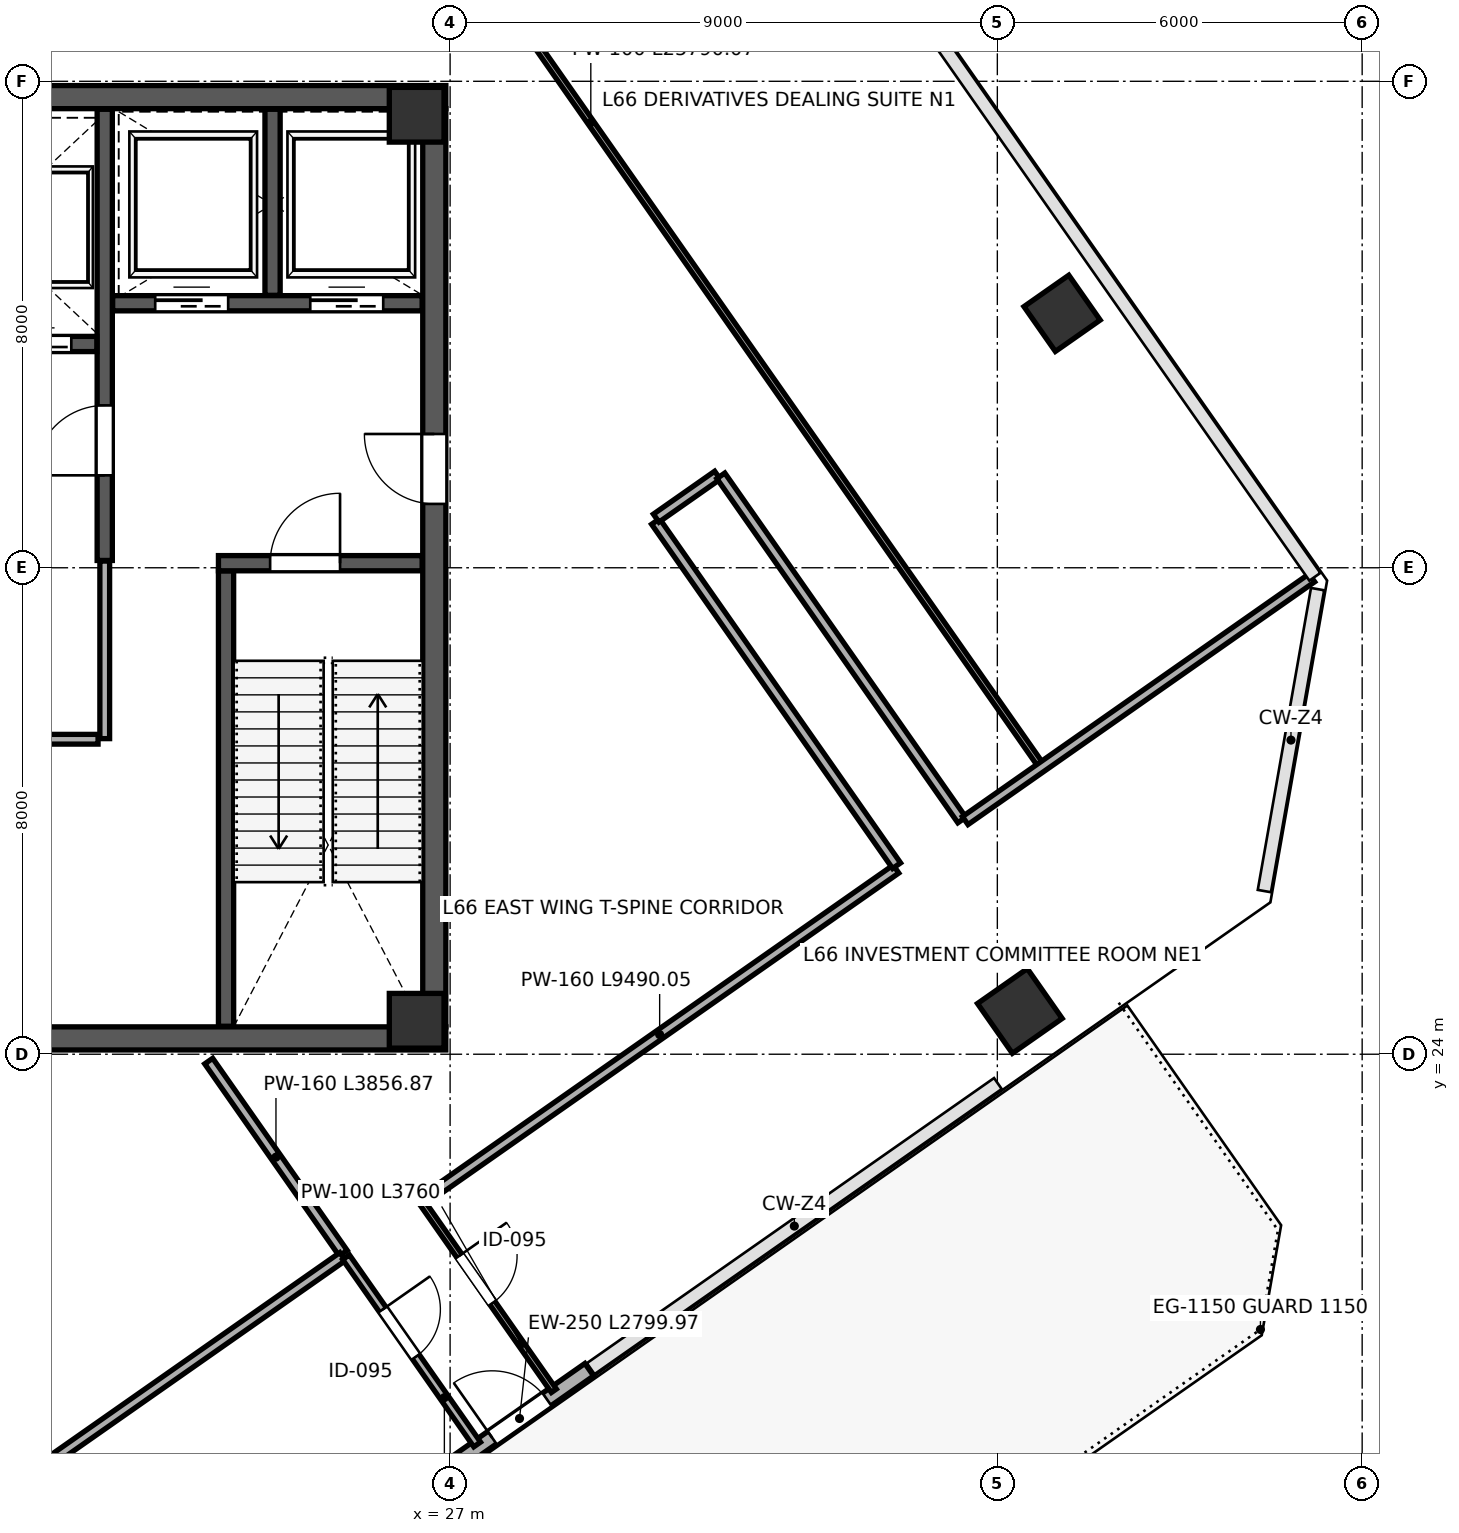
"""IFC4 building model, lengths in metres.
Left out: names, types, materials, properties, quantities, classifications, styles, units other than length and angle.
Written with IfcOpenShell. Run it as: python <this file> out.ifc"""

import sys

from ifc_helpers import new_model, si_unit, direction, frame, frame_2d, origin, origin_2d, place, context, subcontext, project, spatial, rectangle, extrude, source, transform, mapped, element, fill, save


model = new_model("IFC4")
c1 = context("Model", 3, precision=1e-05, world=origin(), true_north=direction((0.0, 1.0)))
c2 = subcontext(c1, "Body", "Model", "MODEL_VIEW")
j1 = project(units=[si_unit("LENGTHUNIT", "METRE"), si_unit("PLANEANGLEUNIT", "RADIAN")], contexts=[c1])
p1 = place(None, origin())
s1 = spatial("IfcSite", under=j1, at=p1, CompositionType="ELEMENT")
p2 = place(p1, origin())
s2 = spatial("IfcBuilding", under=s1, at=p2, CompositionType="ELEMENT")
p3 = place(p2, frame((0.0, 0.0, 293.8)))
s3 = spatial("IfcBuildingStorey", under=s2, at=p3, CompositionType="ELEMENT", Elevation=293.8)
m1 = source(origin(), c2, "Body", "SweptSolid", [
    extrude(rectangle(XDim=0.9, YDim=0.9, at=origin_2d()), origin(), (0.0, 0.0, 1.0), 4.999),
])
for number, where, z_axis, x_axis in (
    (1, (26.45, 24.55, 0.001), (0.0, 0.0, 1.0), (1.0, 0.0, 0.0)),
    (2, (26.45, 39.45, 0.001), (0.0, 0.0, 1.0), (1.0, 0.0, 0.0)),
):
    element("IfcColumn", number, at=place(p3, frame(where, z_axis=z_axis, x_axis=x_axis)), inside=s3, PredefinedType="COLUMN", context=c2, shape_type="MappedRepresentation", body=[
        mapped(m1, transform((0.0, 0.0, 0.0), scale=1.0)),
    ])
m2 = source(origin(), c2, "Body", "SweptSolid", [
    extrude(rectangle(XDim=0.9, YDim=0.9, at=origin_2d()), origin(), (0.0, 0.0, 1.0), 4.999),
])
p4 = place(p3, frame((37.065, 36.184, 0.001), z_axis=(0.0, 0.0, 1.0), x_axis=(-0.573576436351, 0.819152044289, 0.0)))
e3 = element("IfcColumn", 3, at=p4, inside=s3, PredefinedType="COLUMN", context=c2, shape_type="MappedRepresentation", body=[
    mapped(m2, transform((0.0, 0.0, 0.0), scale=1.0)),
])
m3 = source(origin(), c2, "Body", "SweptSolid", [
    extrude(rectangle(XDim=1.0, YDim=1.0, at=origin_2d()), origin(), (0.0, 0.0, 1.0), 4.999),
])
p5 = place(p3, frame((36.37, 24.711, 0.001), z_axis=(0.0, 0.0, 1.0), x_axis=(-0.573576436351, 0.819152044289, 0.0)))
e4 = element("IfcColumn", 4, at=p5, inside=s3, PredefinedType="COLUMN", context=c2, shape_type="MappedRepresentation", body=[
    mapped(m3, transform((0.0, 0.0, 0.0), scale=1.0)),
])
p6 = place(p3, frame((26.995, 17.206, 0.0), z_axis=(0.0, 0.0, 1.0), x_axis=(0.819141785879, 0.573591086599, 0.0)))
e5 = element("IfcWall", 5, at=p6, inside=s3, PredefinedType="SOLIDWALL", context=c2, shape_type="SweptSolid", body=[
    extrude(rectangle(XDim=2.8, YDim=0.25, at=frame_2d((1.4, 0.0))), origin(), (0.0, 0.0, 1.0), 4.76),
])
p7 = place(p6, frame((0.85, 0.0, 0.0)))
e6 = element("IfcOpeningElement", 6, at=p7, cuts=e5, PredefinedType="OPENING", context=c2, shape_type="SweptSolid", body=[
    extrude(rectangle(XDim=1.1, YDim=2.2, at=frame_2d((0.55, 1.1))), frame((0.0, 0.135, 0.0), z_axis=(0.0, -1.0, 0.0), x_axis=(1.0, 0.0, 0.0)), (0.0, 0.0, 1.0), 0.27),
])
p8 = place(p3, frame((26.74, 24.45, 0.0), z_axis=(0.0, 0.0, 1.0), x_axis=(0.0, 1.0, 0.0)))
e7 = element("IfcWall", 7, at=p8, inside=s3, PredefinedType="SHEAR", context=c2, shape_type="SweptSolid", body=[
    extrude(rectangle(XDim=15.1, YDim=0.38, at=frame_2d((7.55, 0.0))), origin(), (0.0, 0.0, 1.0), 4.76),
])
p9 = place(p8, frame((8.6, 0.0, 0.0)))
e8 = element("IfcOpeningElement", 8, at=p9, cuts=e7, PredefinedType="OPENING", context=c2, shape_type="SweptSolid", body=[
    extrude(rectangle(XDim=1.15, YDim=2.2, at=frame_2d((0.575, 1.1))), frame((0.0, 0.2, 0.0), z_axis=(0.0, -1.0, 0.0), x_axis=(1.0, 0.0, 0.0)), (0.0, 0.0, 1.0), 0.4),
])
for number, where, z_axis, x_axis in (
    (9, (9.07, 24.26, 0.0), (0.0, 0.0, 1.0), (1.0, 0.0, 0.0)),
    (10, (9.07, 39.74, 0.0), (0.0, 0.0, 1.0), (1.0, 0.0, 0.0)),
):
    element("IfcWall", number, at=place(p3, frame(where, z_axis=z_axis, x_axis=x_axis)), inside=s3, PredefinedType="SHEAR", context=c2, shape_type="SweptSolid", body=[
        extrude(rectangle(XDim=17.86, YDim=0.38, at=frame_2d((8.93, 0.0))), origin(), (0.0, 0.0, 1.0), 4.76),
    ])
p10 = place(p3, frame((23.315, 24.46, 0.0), z_axis=(0.0, 0.0, 1.0), x_axis=(0.0, 1.0, 0.0)))
e11 = element("IfcWall", 11, at=p10, inside=s3, PredefinedType="SHEAR", context=c2, shape_type="SweptSolid", body=[
    extrude(rectangle(XDim=7.49, YDim=0.25, at=frame_2d((3.745, 0.0))), origin(), (0.0, 0.0, 1.0), 4.76),
])
p11 = place(p3, frame((23.19, 32.075, 0.0), z_axis=(0.0, 0.0, 1.0), x_axis=(1.0, 0.0, 0.0)))
e12 = element("IfcWall", 12, at=p11, inside=s3, PredefinedType="SHEAR", context=c2, shape_type="SweptSolid", body=[
    extrude(rectangle(XDim=3.35, YDim=0.25, at=frame_2d((1.675, 0.0))), origin(), (0.0, 0.0, 1.0), 4.76),
])
p12 = place(p11, frame((0.85, 0.0, 0.0)))
e13 = element("IfcOpeningElement", 13, at=p12, cuts=e12, PredefinedType="OPENING", context=c2, shape_type="SweptSolid", body=[
    extrude(rectangle(XDim=1.15, YDim=2.2, at=frame_2d((0.575, 1.1))), frame((0.0, 0.135, 0.0), z_axis=(0.0, -1.0, 0.0), x_axis=(1.0, 0.0, 0.0)), (0.0, 0.0, 1.0), 0.27),
])
p13 = place(p3, frame((21.32, 32.12, 0.0), z_axis=(0.0, 0.0, 1.0), x_axis=(0.0, 1.0, 0.0)))
e14 = element("IfcWall", 14, at=p13, inside=s3, PredefinedType="SHEAR", context=c2, shape_type="SweptSolid", body=[
    extrude(rectangle(XDim=7.42, YDim=0.25, at=frame_2d((3.71, 0.0))), origin(), (0.0, 0.0, 1.0), 4.76),
])
p14 = place(p13, frame((1.4, 0.0, 0.0)))
e15 = element("IfcOpeningElement", 15, at=p14, cuts=e14, PredefinedType="OPENING", context=c2, shape_type="SweptSolid", body=[
    extrude(rectangle(XDim=1.15, YDim=2.2, at=frame_2d((0.575, 1.1))), frame((0.0, 0.135, 0.0), z_axis=(0.0, -1.0, 0.0), x_axis=(1.0, 0.0, 0.0)), (0.0, 0.0, 1.0), 0.27),
])
p15 = place(p3, frame((21.45, 36.35, 0.0), z_axis=(0.0, 0.0, 1.0), x_axis=(1.0, 0.0, 0.0)))
e16 = element("IfcWall", 16, at=p15, inside=s3, PredefinedType="SHEAR", context=c2, shape_type="SweptSolid", body=[
    extrude(rectangle(XDim=5.09, YDim=0.25, at=frame_2d((2.545, 0.0))), origin(), (0.0, 0.0, 1.0), 4.76),
])
p16 = place(p15, frame((0.7, 0.0, 0.0)))
e17 = element("IfcOpeningElement", 17, at=p16, cuts=e16, PredefinedType="OPENING", context=c2, shape_type="SweptSolid", body=[
    extrude(rectangle(XDim=1.2, YDim=2.2, at=frame_2d((0.6, 1.1))), frame((0.0, 0.135, 0.0), z_axis=(0.0, -1.0, 0.0), x_axis=(1.0, 0.0, 0.0)), (0.0, 0.0, 1.0), 0.27),
])
p17 = place(p15, frame((3.25, 0.0, 0.0)))
e18 = element("IfcOpeningElement", 18, at=p17, cuts=e16, PredefinedType="OPENING", context=c2, shape_type="SweptSolid", body=[
    extrude(rectangle(XDim=1.2, YDim=2.2, at=frame_2d((0.6, 1.1))), frame((0.0, 0.135, 0.0), z_axis=(0.0, -1.0, 0.0), x_axis=(1.0, 0.0, 0.0)), (0.0, 0.0, 1.0), 0.27),
])
p18 = place(p3, frame((24.08, 36.48, 0.0), z_axis=(0.0, 0.0, 1.0), x_axis=(0.0, 1.0, 0.0)))
e19 = element("IfcWall", 19, at=p18, inside=s3, PredefinedType="SHEAR", context=c2, shape_type="SweptSolid", body=[
    extrude(rectangle(XDim=3.06, YDim=0.25, at=frame_2d((1.53, 0.0))), origin(), (0.0, 0.0, 1.0), 4.76),
])
p19 = place(p3, frame((17.32, 35.68, 0.0), z_axis=(0.0, 0.0, 1.0), x_axis=(1.0, 0.0, 0.0)))
e20 = element("IfcWall", 20, at=p19, inside=s3, PredefinedType="SHEAR", context=c2, shape_type="SweptSolid", body=[
    extrude(rectangle(XDim=3.87, YDim=0.25, at=frame_2d((1.935, 0.0))), origin(), (0.0, 0.0, 1.0), 4.76),
])
p20 = place(p19, frame((0.45, 0.0, 0.0)))
e21 = element("IfcOpeningElement", 21, at=p20, cuts=e20, PredefinedType="OPENING", context=c2, shape_type="SweptSolid", body=[
    extrude(rectangle(XDim=1.1, YDim=2.2, at=frame_2d((0.55, 1.1))), frame((0.0, 0.135, 0.0), z_axis=(0.0, -1.0, 0.0), x_axis=(1.0, 0.0, 0.0)), (0.0, 0.0, 1.0), 0.27),
])
p21 = place(p19, frame((2.35, 0.0, 0.0)))
e22 = element("IfcOpeningElement", 22, at=p21, cuts=e20, PredefinedType="OPENING", context=c2, shape_type="SweptSolid", body=[
    extrude(rectangle(XDim=1.1, YDim=2.2, at=frame_2d((0.55, 1.1))), frame((0.0, 0.135, 0.0), z_axis=(0.0, -1.0, 0.0), x_axis=(1.0, 0.0, 0.0)), (0.0, 0.0, 1.0), 0.27),
])
p22 = place(p3, frame((12.84, 29.18, 0.0), z_axis=(0.0, 0.0, 1.0), x_axis=(1.0, 0.0, 0.0)))
e23 = element("IfcWall", 23, at=p22, inside=s3, PredefinedType="PARTITIONING", context=c2, shape_type="SweptSolid", body=[
    extrude(rectangle(XDim=8.37, YDim=0.16, at=frame_2d((4.185, 0.0))), origin(), (0.0, 0.0, 1.0), 4.76),
])
p23 = place(p22, frame((0.95, 0.0, 0.0)))
e24 = element("IfcOpeningElement", 24, at=p23, cuts=e23, PredefinedType="OPENING", context=c2, shape_type="SweptSolid", body=[
    extrude(rectangle(XDim=0.85, YDim=2.1, at=frame_2d((0.425, 1.05))), frame((0.0, 0.09, 0.0), z_axis=(0.0, -1.0, 0.0), x_axis=(1.0, 0.0, 0.0)), (0.0, 0.0, 1.0), 0.18),
])
p24 = place(p22, frame((4.2, 0.0, 0.0)))
e25 = element("IfcOpeningElement", 25, at=p24, cuts=e23, PredefinedType="OPENING", context=c2, shape_type="SweptSolid", body=[
    extrude(rectangle(XDim=0.85, YDim=2.1, at=frame_2d((0.425, 1.05))), frame((0.0, 0.09, 0.0), z_axis=(0.0, -1.0, 0.0), x_axis=(1.0, 0.0, 0.0)), (0.0, 0.0, 1.0), 0.18),
])
p25 = place(p3, frame((21.32, 29.19, 0.0), z_axis=(0.0, 0.0, 1.0), x_axis=(0.0, 1.0, 0.0)))
e26 = element("IfcWall", 26, at=p25, inside=s3, PredefinedType="PARTITIONING", context=c2, shape_type="SweptSolid", body=[
    extrude(rectangle(XDim=2.92, YDim=0.16, at=frame_2d((1.46, 0.0))), origin(), (0.0, 0.0, 1.0), 4.76),
])
p26 = place(p3, frame((23.03, 23.887, 0.0), z_axis=(0.0, 0.0, 1.0), x_axis=(0.573602525203, -0.819133776059, 0.0)))
e27 = element("IfcWall", 27, at=p26, inside=s3, PredefinedType="PARTITIONING", context=c2, shape_type="SweptSolid", body=[
    extrude(rectangle(XDim=3.857, YDim=0.16, at=frame_2d((1.928, 0.0))), origin(), (0.0, 0.0, 1.0), 4.76),
])
p27 = place(p3, frame((21.918, 49.884, 0.0), z_axis=(0.0, 0.0, 1.0), x_axis=(0.57358495776, -0.819146077468, 0.0)))
e28 = element("IfcWall", 28, at=p27, inside=s3, PredefinedType="PARTITIONING", context=c2, shape_type="SweptSolid", body=[
    extrude(rectangle(XDim=25.79, YDim=0.1, at=frame_2d((12.895, 0.0))), origin(), (0.0, 0.0, 1.0), 4.76),
])
p28 = place(p27, frame((9.2, 0.0, 0.0)))
e29 = element("IfcOpeningElement", 29, at=p28, cuts=e28, PredefinedType="OPENING", context=c2, shape_type="SweptSolid", body=[
    extrude(rectangle(XDim=0.95, YDim=2.15, at=frame_2d((0.475, 1.075))), frame((0.0, 0.06, 0.0), z_axis=(0.0, -1.0, 0.0), x_axis=(1.0, 0.0, 0.0)), (0.0, 0.0, 1.0), 0.12),
])
p29 = place(p3, frame((2.071, 36.036, 0.0), z_axis=(0.0, 0.0, 1.0), x_axis=(0.819154854942, 0.573572422302, 0.0)))
e30 = element("IfcWall", 30, at=p29, inside=s3, PredefinedType="PARTITIONING", context=c2, shape_type="SweptSolid", body=[
    extrude(rectangle(XDim=29.62, YDim=0.115, at=frame_2d((14.81, 0.0))), origin(), (0.0, 0.0, 1.0), 4.76),
])
p30 = place(p29, frame((4.2, 0.0, 0.0)))
e31 = element("IfcOpeningElement", 31, at=p30, cuts=e30, PredefinedType="OPENING", context=c2, shape_type="SweptSolid", body=[
    extrude(rectangle(XDim=0.95, YDim=2.15, at=frame_2d((0.475, 1.075))), frame((0.0, 0.067, 0.0), z_axis=(0.0, -1.0, 0.0), x_axis=(1.0, 0.0, 0.0)), (0.0, 0.0, 1.0), 0.135),
])
p31 = place(p3, frame((26.559, 21.601, 0.0), z_axis=(0.0, 0.0, 1.0), x_axis=(0.819143682501, 0.573588378036, 0.0)))
e32 = element("IfcWall", 32, at=p31, inside=s3, PredefinedType="PARTITIONING", context=c2, shape_type="SweptSolid", body=[
    extrude(rectangle(XDim=9.49, YDim=0.16, at=frame_2d((4.745, 0.0))), origin(), (0.0, 0.0, 1.0), 4.76),
])
p32 = place(p3, frame((30.379, 32.76, 0.0), z_axis=(0.0, 0.0, 1.0), x_axis=(0.573609352737, -0.819128995002, 0.0)))
e33 = element("IfcWall", 33, at=p32, inside=s3, PredefinedType="PARTITIONING", context=c2, shape_type="SweptSolid", body=[
    extrude(rectangle(XDim=6.91, YDim=0.16, at=frame_2d((3.455, 0.0))), origin(), (0.0, 0.0, 1.0), 4.76),
])
p33 = place(p3, frame((30.389, 32.816, 0.0), z_axis=(0.0, 0.0, 1.0), x_axis=(0.819129336916, 0.573608864475, 0.0)))
e34 = element("IfcWall", 34, at=p33, inside=s3, PredefinedType="PARTITIONING", context=c2, shape_type="SweptSolid", body=[
    extrude(rectangle(XDim=1.23, YDim=0.16, at=frame_2d((0.615, 0.0))), origin(), (0.0, 0.0, 1.0), 4.76),
])
p34 = place(p3, frame((31.453, 33.512, 0.0), z_axis=(0.0, 0.0, 1.0), x_axis=(0.573585645457, -0.819145595927, 0.0)))
e35 = element("IfcWall", 35, at=p34, inside=s3, PredefinedType="PARTITIONING", context=c2, shape_type="SweptSolid", body=[
    extrude(rectangle(XDim=6.91, YDim=0.16, at=frame_2d((3.455, 0.0))), origin(), (0.0, 0.0, 1.0), 4.76),
])
p35 = place(p3, frame((35.472, 27.842, 0.0), z_axis=(0.0, 0.0, 1.0), x_axis=(0.819151164872, 0.573577692287, 0.0)))
e36 = element("IfcWall", 36, at=p35, inside=s3, PredefinedType="PARTITIONING", context=c2, shape_type="SweptSolid", body=[
    extrude(rectangle(XDim=6.96, YDim=0.16, at=frame_2d((3.48, 0.0))), origin(), (0.0, 0.0, 1.0), 4.76),
])
p36 = place(p3, frame((15.747, 14.03, 0.0), z_axis=(0.0, 0.0, 1.0), x_axis=(0.819150694041, 0.573578364701, 0.0)))
e37 = element("IfcWall", 37, at=p36, inside=s3, PredefinedType="PARTITIONING", context=c2, shape_type="SweptSolid", body=[
    extrude(rectangle(XDim=11.58, YDim=0.16, at=frame_2d((5.79, 0.0))), origin(), (0.0, 0.0, 1.0), 4.76),
])
p37 = place(p3, frame((26.55, 21.546, 0.0), z_axis=(0.0, 0.0, 1.0), x_axis=(0.573614860738, -0.8191251379, 0.0)))
e38 = element("IfcWall", 38, at=p37, inside=s3, PredefinedType="PARTITIONING", context=c2, shape_type="SweptSolid", body=[
    extrude(rectangle(XDim=3.76, YDim=0.1, at=frame_2d((1.88, 0.0))), origin(), (0.0, 0.0, 1.0), 4.76),
])
p38 = place(p37, frame((1.05, 0.0, 0.0)))
e39 = element("IfcOpeningElement", 39, at=p38, cuts=e38, PredefinedType="OPENING", context=c2, shape_type="SweptSolid", body=[
    extrude(rectangle(XDim=0.95, YDim=2.15, at=frame_2d((0.475, 1.075))), frame((0.0, 0.06, 0.0), z_axis=(0.0, -1.0, 0.0), x_axis=(1.0, 0.0, 0.0)), (0.0, 0.0, 1.0), 0.12),
])
p39 = place(p3, frame((25.288, 20.662, 0.0), z_axis=(0.0, 0.0, 1.0), x_axis=(0.573614860738, -0.8191251379, 0.0)))
e40 = element("IfcWall", 40, at=p39, inside=s3, PredefinedType="PARTITIONING", context=c2, shape_type="SweptSolid", body=[
    extrude(rectangle(XDim=3.76, YDim=0.135, at=frame_2d((1.88, 0.0))), origin(), (0.0, 0.0, 1.0), 4.76),
])
p40 = place(p39, frame((1.05, 0.0, 0.0)))
e41 = element("IfcOpeningElement", 41, at=p40, cuts=e40, PredefinedType="OPENING", context=c2, shape_type="SweptSolid", body=[
    extrude(rectangle(XDim=0.95, YDim=2.15, at=frame_2d((0.475, 1.075))), frame((0.0, 0.078, 0.0), z_axis=(0.0, -1.0, 0.0), x_axis=(1.0, 0.0, 0.0)), (0.0, 0.0, 1.0), 0.155),
])
m4 = source(origin(), c2, "Body", "SweptSolid", [
    extrude(rectangle(XDim=1.1, YDim=2.2, at=frame_2d((0.55, 1.1))), frame((0.0, 0.025, 0.0), z_axis=(0.0, -1.0, 0.0), x_axis=(1.0, 0.0, 0.0)), (0.0, 0.0, 1.0), 0.05),
])
p41 = place(p7, origin())
e42 = element("IfcDoor", 42, at=p41, inside=s3, OperationType="SINGLE_SWING_LEFT", PredefinedType="DOOR", context=c2, shape_type="MappedRepresentation", body=[
    mapped(m4, transform((0.0, 0.0, 0.0), scale=1.0)),
])
fill(e6, e42)
m5 = source(origin(), c2, "Body", "SweptSolid", [
    extrude(rectangle(XDim=1.15, YDim=2.2, at=frame_2d((0.575, 1.1))), frame((0.0, 0.025, 0.0), z_axis=(0.0, -1.0, 0.0), x_axis=(1.0, 0.0, 0.0)), (0.0, 0.0, 1.0), 0.05),
])
p42 = place(p14, origin())
e43 = element("IfcDoor", 43, at=p42, inside=s3, OperationType="SINGLE_SWING_LEFT", PredefinedType="DOOR", context=c2, shape_type="MappedRepresentation", body=[
    mapped(m5, transform((0.0, 0.0, 0.0), scale=1.0)),
])
fill(e15, e43)
m6 = source(origin(), c2, "Body", "SweptSolid", [
    extrude(rectangle(XDim=1.15, YDim=2.2, at=frame_2d((0.575, 1.1))), frame((0.0, 0.025, 0.0), z_axis=(0.0, -1.0, 0.0), x_axis=(1.0, 0.0, 0.0)), (0.0, 0.0, 1.0), 0.05),
])
p43 = place(p12, origin())
e44 = element("IfcDoor", 44, at=p43, inside=s3, OperationType="SINGLE_SWING_RIGHT", PredefinedType="DOOR", context=c2, shape_type="MappedRepresentation", body=[
    mapped(m6, transform((0.0, 0.0, 0.0), scale=1.0)),
])
fill(e13, e44)
p44 = place(p9, origin())
e45 = element("IfcDoor", 45, at=p44, inside=s3, OperationType="SINGLE_SWING_RIGHT", PredefinedType="DOOR", context=c2, shape_type="MappedRepresentation", body=[
    mapped(m5, transform((0.0, 0.0, 0.0), scale=1.0)),
])
fill(e8, e45)
m7 = source(origin(), c2, "Body", "SweptSolid", [
    extrude(rectangle(XDim=1.1, YDim=2.2, at=frame_2d((0.55, 1.1))), frame((0.0, 0.025, 0.0), z_axis=(0.0, -1.0, 0.0), x_axis=(1.0, 0.0, 0.0)), (0.0, 0.0, 1.0), 0.05),
])
p45 = place(p21, origin())
e46 = element("IfcDoor", 46, at=p45, inside=s3, OperationType="SLIDING_TO_RIGHT", PredefinedType="DOOR", context=c2, shape_type="MappedRepresentation", body=[
    mapped(m7, transform((0.0, 0.0, 0.0), scale=1.0)),
])
fill(e22, e46)
m8 = source(origin(), c2, "Body", "SweptSolid", [
    extrude(rectangle(XDim=1.2, YDim=2.2, at=frame_2d((0.6, 1.1))), frame((0.0, 0.025, 0.0), z_axis=(0.0, -1.0, 0.0), x_axis=(1.0, 0.0, 0.0)), (0.0, 0.0, 1.0), 0.05),
])
p46 = place(p16, origin())
e47 = element("IfcDoor", 47, at=p46, inside=s3, OperationType="SLIDING_TO_LEFT", PredefinedType="DOOR", context=c2, shape_type="MappedRepresentation", body=[
    mapped(m8, transform((0.0, 0.0, 0.0), scale=1.0)),
])
fill(e17, e47)
p47 = place(p17, origin())
e48 = element("IfcDoor", 48, at=p47, inside=s3, OperationType="SLIDING_TO_RIGHT", PredefinedType="DOOR", context=c2, shape_type="MappedRepresentation", body=[
    mapped(m8, transform((0.0, 0.0, 0.0), scale=1.0)),
])
fill(e18, e48)
m9 = source(origin(), c2, "Body", "SweptSolid", [
    extrude(rectangle(XDim=0.95, YDim=2.15, at=frame_2d((0.475, 1.075))), frame((0.0, 0.025, 0.0), z_axis=(0.0, -1.0, 0.0), x_axis=(1.0, 0.0, 0.0)), (0.0, 0.0, 1.0), 0.05),
])
p48 = place(p38, origin())
e49 = element("IfcDoor", 49, at=p48, inside=s3, OperationType="SINGLE_SWING_LEFT", PredefinedType="DOOR", context=c2, shape_type="MappedRepresentation", body=[
    mapped(m9, transform((0.0, 0.0, 0.0), scale=1.0)),
])
fill(e39, e49)
p49 = place(p40, origin())
e50 = element("IfcDoor", 50, at=p49, inside=s3, OperationType="SINGLE_SWING_LEFT", PredefinedType="DOOR", context=c2, shape_type="MappedRepresentation", body=[
    mapped(m9, transform((0.0, 0.0, 0.0), scale=1.0)),
])
fill(e41, e50)
save(model, sys.argv[1])
